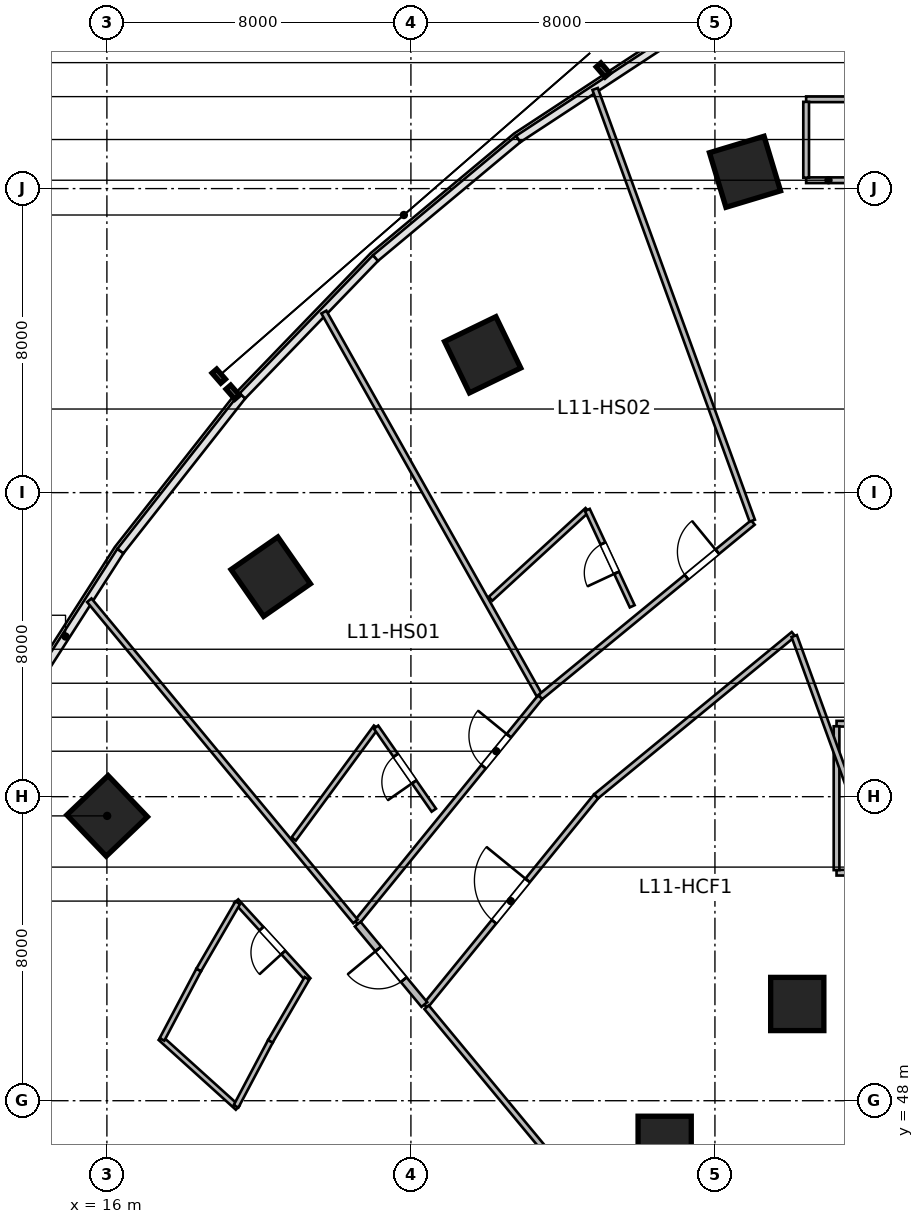
"""IFC4 building model, lengths in metres.
Left out: names, types, materials, properties, quantities, classifications, styles, units other than length and angle.
Written with IfcOpenShell. Run it as: python <this file> out.ifc"""

import sys

from ifc_helpers import new_model, si_unit, direction, frame, frame_2d, origin, origin_2d, place, context, subcontext, project, spatial, rectangle, circle, extrude, source, transform, mapped, element, fill, save


model = new_model("IFC4")
c1 = context("Model", 3, precision=1e-05, world=origin(), true_north=direction((0.0, 1.0)))
c2 = subcontext(c1, "Body", "Model", "MODEL_VIEW")
j1 = project(units=[si_unit("LENGTHUNIT", "METRE"), si_unit("PLANEANGLEUNIT", "RADIAN")], contexts=[c1])
p1 = place(None, origin())
s1 = spatial("IfcSite", under=j1, at=p1, CompositionType="ELEMENT")
p2 = place(p1, origin())
s2 = spatial("IfcBuilding", under=s1, at=p2, CompositionType="ELEMENT")
p3 = place(p2, frame((0.0, 0.0, 53.4)))
s3 = spatial("IfcBuildingStorey", under=s2, at=p3, CompositionType="ELEMENT", Elevation=53.4)
m1 = source(origin(), c2, "Body", "SweptSolid", [
    extrude(rectangle(XDim=1.5, YDim=1.5, at=origin_2d()), origin(), (0.0, 0.0, 1.0), 3.6),
])
p4 = place(p3, frame((16.007, 55.494, 0.0), z_axis=(0.0, 0.0, 1.0), x_axis=(-0.690756218984, 0.723087716626, 0.0)))
e1 = element("IfcColumn", 1, at=p4, inside=s3, PredefinedType="COLUMN", context=c2, shape_type="MappedRepresentation", body=[
    mapped(m1, transform((0.0, 0.0, 0.0), scale=1.0)),
])
m2 = source(origin(), c2, "Body", "SweptSolid", [
    extrude(circle(Radius=0.7, at=origin_2d()), origin(), (0.0, 0.0, 1.0), 3.6),
])
p5 = place(p3, frame((30.677, 46.892, 0.0), z_axis=(0.0, 0.0, 1.0), x_axis=(-0.571143442153, 0.820850271661, 0.0)))
e2 = element("IfcColumn", 2, at=p5, inside=s3, PredefinedType="COLUMN", context=c2, shape_type="MappedRepresentation", body=[
    mapped(m2, transform((0.0, 0.0, 0.0), scale=1.0)),
])
p6 = place(p3, frame((20.311, 61.789, 0.0), z_axis=(0.0, 0.0, 1.0), x_axis=(-0.571143442153, 0.820850271661, 0.0)))
e3 = element("IfcColumn", 3, at=p6, inside=s3, PredefinedType="COLUMN", context=c2, shape_type="MappedRepresentation", body=[
    mapped(m1, transform((0.0, 0.0, 0.0), scale=1.0)),
])
p7 = place(p3, frame((34.166, 50.545, 0.0), z_axis=(0.0, 0.0, 1.0), x_axis=(-0.436173672171, 0.899862504889, 0.0)))
e4 = element("IfcColumn", 4, at=p7, inside=s3, PredefinedType="COLUMN", context=c2, shape_type="MappedRepresentation", body=[
    mapped(m2, transform((0.0, 0.0, 0.0), scale=1.0)),
])
for number, where, z_axis, x_axis in (
    (5, (25.888, 67.627, 0.0), (0.0, 0.0, 1.0), (-0.436, 0.9, 0.0)),
    (6, (32.791, 72.442, 0.0), (0.0, 0.0, 1.0), (-0.289, 0.957, 0.0)),
):
    element("IfcColumn", number, at=place(p3, frame(where, z_axis=z_axis, x_axis=x_axis)), inside=s3, PredefinedType="COLUMN", context=c2, shape_type="MappedRepresentation", body=[
        mapped(m1, transform((0.0, 0.0, 0.0), scale=1.0)),
    ])
m3 = source(origin(), c2, "Body", "SweptSolid", [
    extrude(rectangle(XDim=2.1, YDim=0.15, at=frame_2d((1.05, 0.0))), origin(), (0.0, 0.0, 1.0), 3.36),
])
p8 = place(p3, frame((34.4, 72.22, 0.0), z_axis=(0.0, 0.0, 1.0), x_axis=(1.0, 0.0, 0.0)))
e7 = element("IfcWall", 7, at=p8, inside=s3, PredefinedType="PARTITIONING", context=c2, shape_type="MappedRepresentation", body=[
    mapped(m3, transform((0.0, 0.0, 0.0), scale=1.0)),
])
m4 = source(origin(), c2, "Body", "SweptSolid", [
    extrude(rectangle(XDim=3.1, YDim=0.15, at=frame_2d((1.55, 0.0))), origin(), (0.0, 0.0, 1.0), 2.729),
])
p9 = place(p3, frame((34.4, 74.35, 0.0), z_axis=(0.0, 0.0, 1.0), x_axis=(1.0, 0.0, 0.0)))
e8 = element("IfcWall", 8, at=p9, inside=s3, PredefinedType="PARTITIONING", context=c2, shape_type="MappedRepresentation", body=[
    mapped(m4, transform((0.0, 0.0, 0.0), scale=1.0)),
])
m5 = source(origin(), c2, "Body", "SweptSolid", [
    extrude(rectangle(XDim=1.995, YDim=0.15, at=frame_2d((0.998, 0.0))), origin(), (0.0, 0.0, 1.0), 3.36),
])
p10 = place(p3, frame((34.4, 72.288, 0.0), z_axis=(0.0, 0.0, 1.0), x_axis=(0.0, 1.0, 0.0)))
e9 = element("IfcWall", 9, at=p10, inside=s3, PredefinedType="PARTITIONING", context=c2, shape_type="MappedRepresentation", body=[
    mapped(m5, transform((0.0, 0.0, 0.0), scale=1.0)),
])
m6 = source(origin(), c2, "Body", "SweptSolid", [
    extrude(rectangle(XDim=6.6, YDim=0.15, at=frame_2d((3.3, 0.0))), origin(), (0.0, 0.0, 1.0), 2.803),
])
p11 = place(p3, frame((35.2, 54.0, 0.0), z_axis=(0.0, 0.0, 1.0), x_axis=(1.0, 0.0, 0.0)))
e10 = element("IfcWall", 10, at=p11, inside=s3, PredefinedType="PARTITIONING", context=c2, shape_type="MappedRepresentation", body=[
    mapped(m6, transform((0.0, 0.0, 0.0), scale=1.0)),
])
m7 = source(origin(), c2, "Body", "SweptSolid", [
    extrude(rectangle(XDim=6.6, YDim=0.15, at=frame_2d((3.3, 0.0))), origin(), (0.0, 0.0, 1.0), 3.36),
])
p12 = place(p3, frame((35.2, 57.92, 0.0), z_axis=(0.0, 0.0, 1.0), x_axis=(1.0, 0.0, 0.0)))
e11 = element("IfcWall", 11, at=p12, inside=s3, PredefinedType="PARTITIONING", context=c2, shape_type="MappedRepresentation", body=[
    mapped(m7, transform((0.0, 0.0, 0.0), scale=1.0)),
])
p13 = place(p12, frame((2.85, 0.0, 0.0)))
e12 = element("IfcOpeningElement", 12, at=p13, cuts=e11, PredefinedType="OPENING", context=c2, shape_type="SweptSolid", body=[
    extrude(rectangle(XDim=0.9, YDim=2.1, at=frame_2d((0.45, 1.05))), frame((0.0, 0.085, 0.0), z_axis=(0.0, -1.0, 0.0), x_axis=(1.0, 0.0, 0.0)), (0.0, 0.0, 1.0), 0.17),
])
m8 = source(origin(), c2, "Body", "SweptSolid", [
    extrude(rectangle(XDim=3.785, YDim=0.15, at=frame_2d((1.893, 0.0))), origin(), (0.0, 0.0, 1.0), 3.36),
])
p14 = place(p3, frame((35.2, 54.067, 0.0), z_axis=(0.0, 0.0, 1.0), x_axis=(0.0, 1.0, 0.0)))
e13 = element("IfcWall", 13, at=p14, inside=s3, PredefinedType="PARTITIONING", context=c2, shape_type="MappedRepresentation", body=[
    mapped(m8, transform((0.0, 0.0, 0.0), scale=1.0)),
])
m9 = source(origin(), c2, "Body", "SweptSolid", [
    extrude(rectangle(XDim=7.659, YDim=0.15, at=frame_2d((3.829, 0.0))), origin(), (0.0, 0.0, 1.0), 3.36),
])
p15 = place(p3, frame((22.57, 52.683, 0.0), z_axis=(0.0, 0.0, 1.0), x_axis=(0.631489868862, 0.775384127723, 0.0)))
e14 = element("IfcWall", 14, at=p15, inside=s3, PredefinedType="PARTITIONING", context=c2, shape_type="MappedRepresentation", body=[
    mapped(m9, transform((0.0, 0.0, 0.0), scale=1.0)),
])
p16 = place(p15, frame((5.295, 0.0, 0.0)))
e15 = element("IfcOpeningElement", 15, at=p16, cuts=e14, PredefinedType="OPENING", context=c2, shape_type="SweptSolid", body=[
    extrude(rectangle(XDim=1.05, YDim=2.15, at=frame_2d((0.525, 1.075))), frame((0.0, 0.085, 0.0), z_axis=(0.0, -1.0, 0.0), x_axis=(1.0, 0.0, 0.0)), (0.0, 0.0, 1.0), 0.17),
])
m10 = source(origin(), c2, "Body", "SweptSolid", [
    extrude(rectangle(XDim=10.975, YDim=0.15, at=frame_2d((5.487, 0.0))), origin(), (0.0, 0.0, 1.0), 3.36),
])
p17 = place(p3, frame((22.54, 52.719, 0.0), z_axis=(0.0, 0.0, 1.0), x_axis=(-0.638125265812, 0.769932558821, 0.0)))
e16 = element("IfcWall", 16, at=p17, inside=s3, PredefinedType="PARTITIONING", context=c2, shape_type="MappedRepresentation", body=[
    mapped(m10, transform((0.0, 0.0, 0.0), scale=1.0)),
])
m11 = source(origin(), c2, "Body", "SweptSolid", [
    extrude(rectangle(XDim=11.573, YDim=0.15, at=frame_2d((5.786, 0.0))), origin(), (0.0, 0.0, 1.0), 3.36),
])
p18 = place(p3, frame((27.382, 58.664, 0.0), z_axis=(0.0, 0.0, 1.0), x_axis=(-0.490161073951, 0.871631872744, 0.0)))
e17 = element("IfcWall", 17, at=p18, inside=s3, PredefinedType="PARTITIONING", context=c2, shape_type="MappedRepresentation", body=[
    mapped(m11, transform((0.0, 0.0, 0.0), scale=1.0)),
])
m12 = source(origin(), c2, "Body", "SweptSolid", [
    extrude(rectangle(XDim=3.656, YDim=0.14, at=frame_2d((1.828, 0.0))), origin(), (0.0, 0.0, 1.0), 3.36),
])
p19 = place(p3, frame((20.915, 54.886, 0.0), z_axis=(0.0, 0.0, 1.0), x_axis=(0.592700141555, 0.805423206892, 0.0)))
e18 = element("IfcWall", 18, at=p19, inside=s3, PredefinedType="PARTITIONING", context=c2, shape_type="MappedRepresentation", body=[
    mapped(m12, transform((0.0, 0.0, 0.0), scale=1.0)),
])
m13 = source(origin(), c2, "Body", "SweptSolid", [
    extrude(rectangle(XDim=2.663, YDim=0.14, at=frame_2d((1.332, 0.0))), origin(), (0.0, 0.0, 1.0), 2.644),
])
p20 = place(p3, frame((24.603, 55.645, 0.0), z_axis=(0.0, 0.0, 1.0), x_axis=(-0.570905989724, 0.821015438891, 0.0)))
e19 = element("IfcWall", 19, at=p20, inside=s3, PredefinedType="PARTITIONING", context=c2, shape_type="MappedRepresentation", body=[
    mapped(m13, transform((0.0, 0.0, 0.0), scale=1.0)),
])
p21 = place(p20, frame((0.906, 0.0, 0.0)))
e20 = element("IfcOpeningElement", 20, at=p21, cuts=e19, PredefinedType="OPENING", context=c2, shape_type="SweptSolid", body=[
    extrude(rectangle(XDim=0.85, YDim=2.05, at=frame_2d((0.425, 1.025))), frame((0.0, 0.08, 0.0), z_axis=(0.0, -1.0, 0.0), x_axis=(1.0, 0.0, 0.0)), (0.0, 0.0, 1.0), 0.16),
])
m14 = source(origin(), c2, "Body", "SweptSolid", [
    extrude(rectangle(XDim=7.237, YDim=0.15, at=frame_2d((3.618, 0.0))), origin(), (0.0, 0.0, 1.0), 3.36),
])
p22 = place(p3, frame((27.406, 58.621, 0.0), z_axis=(0.0, 0.0, 1.0), x_axis=(0.772813707793, 0.634632943557, 0.0)))
e21 = element("IfcWall", 21, at=p22, inside=s3, PredefinedType="PARTITIONING", context=c2, shape_type="MappedRepresentation", body=[
    mapped(m14, transform((0.0, 0.0, 0.0), scale=1.0)),
])
p23 = place(p22, frame((4.975, 0.0, 0.0)))
e22 = element("IfcOpeningElement", 22, at=p23, cuts=e21, PredefinedType="OPENING", context=c2, shape_type="SweptSolid", body=[
    extrude(rectangle(XDim=1.05, YDim=2.15, at=frame_2d((0.525, 1.075))), frame((0.0, 0.085, 0.0), z_axis=(0.0, -1.0, 0.0), x_axis=(1.0, 0.0, 0.0)), (0.0, 0.0, 1.0), 0.17),
])
m15 = source(origin(), c2, "Body", "SweptSolid", [
    extrude(rectangle(XDim=12.088, YDim=0.15, at=frame_2d((6.044, 0.0))), origin(), (0.0, 0.0, 1.0), 3.36),
])
p24 = place(p3, frame((32.981, 63.262, 0.0), z_axis=(0.0, 0.0, 1.0), x_axis=(-0.34203007529, 0.939689005787, 0.0)))
e23 = element("IfcWall", 23, at=p24, inside=s3, PredefinedType="PARTITIONING", context=c2, shape_type="MappedRepresentation", body=[
    mapped(m15, transform((0.0, 0.0, 0.0), scale=1.0)),
])
m16 = source(origin(), c2, "Body", "SweptSolid", [
    extrude(rectangle(XDim=3.456, YDim=0.14, at=frame_2d((1.728, 0.0))), origin(), (0.0, 0.0, 1.0), 3.36),
])
p25 = place(p3, frame((26.095, 61.207, 0.0), z_axis=(0.0, 0.0, 1.0), x_axis=(0.736860870293, 0.676044420013, 0.0)))
e24 = element("IfcWall", 24, at=p25, inside=s3, PredefinedType="PARTITIONING", context=c2, shape_type="MappedRepresentation", body=[
    mapped(m16, transform((0.0, 0.0, 0.0), scale=1.0)),
])
m17 = source(origin(), c2, "Body", "SweptSolid", [
    extrude(rectangle(XDim=2.796, YDim=0.14, at=frame_2d((1.398, 0.0))), origin(), (0.0, 0.0, 1.0), 3.36),
])
p26 = place(p3, frame((29.823, 61.009, 0.0), z_axis=(0.0, 0.0, 1.0), x_axis=(-0.422316594955, 0.906448395456, 0.0)))
e25 = element("IfcWall", 25, at=p26, inside=s3, PredefinedType="PARTITIONING", context=c2, shape_type="MappedRepresentation", body=[
    mapped(m17, transform((0.0, 0.0, 0.0), scale=1.0)),
])
p27 = place(p26, frame((0.973, 0.0, 0.0)))
e26 = element("IfcOpeningElement", 26, at=p27, cuts=e25, PredefinedType="OPENING", context=c2, shape_type="SweptSolid", body=[
    extrude(rectangle(XDim=0.85, YDim=2.05, at=frame_2d((0.425, 1.025))), frame((0.0, 0.08, 0.0), z_axis=(0.0, -1.0, 0.0), x_axis=(1.0, 0.0, 0.0)), (0.0, 0.0, 1.0), 0.16),
])
m18 = source(origin(), c2, "Body", "SweptSolid", [
    extrude(rectangle(XDim=7.113, YDim=0.15, at=frame_2d((3.556, 0.0))), origin(), (0.0, 0.0, 1.0), 3.36),
])
p28 = place(p3, frame((24.383, 50.495, 0.0), z_axis=(0.0, 0.0, 1.0), x_axis=(0.63149032532, 0.775383755974, 0.0)))
e27 = element("IfcWall", 27, at=p28, inside=s3, PredefinedType="PARTITIONING", context=c2, shape_type="MappedRepresentation", body=[
    mapped(m18, transform((0.0, 0.0, 0.0), scale=1.0)),
])
p29 = place(p28, frame((2.856, 0.0, 0.0)))
e28 = element("IfcOpeningElement", 28, at=p29, cuts=e27, PredefinedType="OPENING", context=c2, shape_type="SweptSolid", body=[
    extrude(rectangle(XDim=1.4, YDim=2.15, at=frame_2d((0.7, 1.075))), frame((0.0, 0.085, 0.0), z_axis=(0.0, -1.0, 0.0), x_axis=(1.0, 0.0, 0.0)), (0.0, 0.0, 1.0), 0.17),
])
m19 = source(origin(), c2, "Body", "SweptSolid", [
    extrude(rectangle(XDim=6.721, YDim=0.15, at=frame_2d((3.361, 0.0))), origin(), (0.0, 0.0, 1.0), 3.36),
])
p30 = place(p3, frame((28.874, 56.01, 0.0), z_axis=(0.0, 0.0, 1.0), x_axis=(0.772828051199, 0.63461547671, 0.0)))
e29 = element("IfcWall", 29, at=p30, inside=s3, PredefinedType="PARTITIONING", context=c2, shape_type="MappedRepresentation", body=[
    mapped(m19, transform((0.0, 0.0, 0.0), scale=1.0)),
])
m20 = source(origin(), c2, "Body", "SweptSolid", [
    extrude(rectangle(XDim=11.053, YDim=0.15, at=frame_2d((5.527, 0.0))), origin(), (0.0, 0.0, 1.0), 3.36),
])
p31 = place(p3, frame((31.466, 41.949, 0.0), z_axis=(0.0, 0.0, 1.0), x_axis=(-0.638131235571, 0.769927611005, 0.0)))
e30 = element("IfcWall", 30, at=p31, inside=s3, PredefinedType="PARTITIONING", context=c2, shape_type="MappedRepresentation", body=[
    mapped(m20, transform((0.0, 0.0, 0.0), scale=1.0)),
])
m21 = source(origin(), c2, "Body", "SweptSolid", [
    extrude(rectangle(XDim=12.196, YDim=0.15, at=frame_2d((6.098, 0.0))), origin(), (0.0, 0.0, 1.0), 3.36),
])
p32 = place(p3, frame((38.258, 48.766, 0.0), z_axis=(0.0, 0.0, 1.0), x_axis=(-0.342022711534, 0.939691686031, 0.0)))
e31 = element("IfcWall", 31, at=p32, inside=s3, PredefinedType="PARTITIONING", context=c2, shape_type="MappedRepresentation", body=[
    mapped(m21, transform((0.0, 0.0, 0.0), scale=1.0)),
])
m22 = source(origin(), c2, "Body", "SweptSolid", [
    extrude(rectangle(XDim=2.748, YDim=0.195, at=frame_2d((1.374, 0.0))), origin(), (0.0, 0.0, 1.0), 3.36),
])
p33 = place(p3, frame((24.353, 50.531, 0.0), z_axis=(0.0, 0.0, 1.0), x_axis=(-0.638111168284, 0.769944242729, 0.0)))
e32 = element("IfcWall", 32, at=p33, inside=s3, PredefinedType="PARTITIONING", context=c2, shape_type="MappedRepresentation", body=[
    mapped(m22, transform((0.0, 0.0, 0.0), scale=1.0)),
])
p34 = place(p33, frame((0.849, 0.0, 0.0)))
e33 = element("IfcOpeningElement", 33, at=p34, cuts=e32, PredefinedType="OPENING", context=c2, shape_type="SweptSolid", body=[
    extrude(rectangle(XDim=1.05, YDim=2.15, at=frame_2d((0.525, 1.075))), frame((0.0, 0.107, 0.0), z_axis=(0.0, -1.0, 0.0), x_axis=(1.0, 0.0, 0.0)), (0.0, 0.0, 1.0), 0.215),
])
m23 = source(origin(), c2, "Body", "SweptSolid", [
    extrude(rectangle(XDim=2.812, YDim=0.14, at=frame_2d((1.406, 0.0))), origin(), (0.0, 0.0, 1.0), 3.36),
])
p35 = place(p3, frame((21.303, 51.177, 0.0), z_axis=(0.0, 0.0, 1.0), x_axis=(-0.675119025852, 0.737708818527, 0.0)))
e34 = element("IfcWall", 34, at=p35, inside=s3, PredefinedType="PARTITIONING", context=c2, shape_type="MappedRepresentation", body=[
    mapped(m23, transform((0.0, 0.0, 0.0), scale=1.0)),
])
p36 = place(p35, frame((0.981, 0.0, 0.0)))
e35 = element("IfcOpeningElement", 35, at=p36, cuts=e34, PredefinedType="OPENING", context=c2, shape_type="SweptSolid", body=[
    extrude(rectangle(XDim=0.85, YDim=2.05, at=frame_2d((0.425, 1.025))), frame((0.0, 0.08, 0.0), z_axis=(0.0, -1.0, 0.0), x_axis=(1.0, 0.0, 0.0)), (0.0, 0.0, 1.0), 0.16),
])
m24 = source(origin(), c2, "Body", "SweptSolid", [
    extrude(rectangle(XDim=2.738, YDim=0.14, at=frame_2d((1.369, 0.0))), origin(), (0.0, 0.0, 1.0), 3.36),
])
p37 = place(p3, frame((19.44, 47.814, 0.0), z_axis=(0.0, 0.0, 1.0), x_axis=(-0.741873676582, 0.670539669218, 0.0)))
e36 = element("IfcWall", 36, at=p37, inside=s3, PredefinedType="PARTITIONING", context=c2, shape_type="MappedRepresentation", body=[
    mapped(m24, transform((0.0, 0.0, 0.0), scale=1.0)),
])
m25 = source(origin(), c2, "Body", "SweptSolid", [
    extrude(rectangle(XDim=1.936, YDim=0.14, at=frame_2d((0.968, 0.0))), origin(), (0.0, 0.0, 1.0), 3.36),
])
p38 = place(p3, frame((19.398, 47.852, 0.0), z_axis=(0.0, 0.0, 1.0), x_axis=(0.467174971862, 0.884164886017, 0.0)))
e37 = element("IfcWall", 37, at=p38, inside=s3, PredefinedType="PARTITIONING", context=c2, shape_type="MappedRepresentation", body=[
    mapped(m25, transform((0.0, 0.0, 0.0), scale=1.0)),
])
m26 = source(origin(), c2, "Body", "SweptSolid", [
    extrude(rectangle(XDim=2.068, YDim=0.14, at=frame_2d((1.034, 0.0))), origin(), (0.0, 0.0, 1.0), 3.36),
])
p39 = place(p3, frame((17.45, 49.612, 0.0), z_axis=(0.0, 0.0, 1.0), x_axis=(0.467215057643, 0.884143704333, 0.0)))
e38 = element("IfcWall", 38, at=p39, inside=s3, PredefinedType="PARTITIONING", context=c2, shape_type="MappedRepresentation", body=[
    mapped(m26, transform((0.0, 0.0, 0.0), scale=1.0)),
])
m27 = source(origin(), c2, "Body", "SweptSolid", [
    extrude(rectangle(XDim=1.914, YDim=0.14, at=frame_2d((0.957, 0.0))), origin(), (0.0, 0.0, 1.0), 3.36),
])
p40 = place(p3, frame((20.303, 49.563, 0.0), z_axis=(0.0, 0.0, 1.0), x_axis=(0.502347790612, 0.864665656347, 0.0)))
e39 = element("IfcWall", 39, at=p40, inside=s3, PredefinedType="PARTITIONING", context=c2, shape_type="MappedRepresentation", body=[
    mapped(m27, transform((0.0, 0.0, 0.0), scale=1.0)),
])
m28 = source(origin(), c2, "Body", "SweptSolid", [
    extrude(rectangle(XDim=2.045, YDim=0.14, at=frame_2d((1.022, 0.0))), origin(), (0.0, 0.0, 1.0), 3.36),
])
p41 = place(p3, frame((18.416, 51.441, 0.0), z_axis=(0.0, 0.0, 1.0), x_axis=(0.5023112139, 0.864686905411, 0.0)))
e40 = element("IfcWall", 40, at=p41, inside=s3, PredefinedType="PARTITIONING", context=c2, shape_type="MappedRepresentation", body=[
    mapped(m28, transform((0.0, 0.0, 0.0), scale=1.0)),
])
m29 = source(origin(), c2, "Body", "SweptSolid", [
    extrude(rectangle(XDim=1.05, YDim=2.15, at=frame_2d((0.525, 1.075))), frame((0.0, 0.025, 0.0), z_axis=(0.0, -1.0, 0.0), x_axis=(1.0, 0.0, 0.0)), (0.0, 0.0, 1.0), 0.05),
])
p42 = place(p16, origin())
e41 = element("IfcDoor", 41, at=p42, inside=s3, OperationType="SINGLE_SWING_RIGHT", PredefinedType="DOOR", context=c2, shape_type="MappedRepresentation", body=[
    mapped(m29, transform((0.0, 0.0, 0.0), scale=1.0)),
])
fill(e15, e41)
m30 = source(origin(), c2, "Body", "SweptSolid", [
    extrude(rectangle(XDim=0.85, YDim=2.05, at=frame_2d((0.425, 1.025))), frame((0.0, 0.025, 0.0), z_axis=(0.0, -1.0, 0.0), x_axis=(1.0, 0.0, 0.0)), (0.0, 0.0, 1.0), 0.05),
])
p43 = place(p21, origin())
e42 = element("IfcDoor", 42, at=p43, inside=s3, OperationType="SINGLE_SWING_LEFT", PredefinedType="DOOR", context=c2, shape_type="MappedRepresentation", body=[
    mapped(m30, transform((0.0, 0.0, 0.0), scale=1.0)),
])
fill(e20, e42)
p44 = place(p23, origin())
e43 = element("IfcDoor", 43, at=p44, inside=s3, OperationType="SINGLE_SWING_RIGHT", PredefinedType="DOOR", context=c2, shape_type="MappedRepresentation", body=[
    mapped(m29, transform((0.0, 0.0, 0.0), scale=1.0)),
])
fill(e22, e43)
p45 = place(p27, origin())
e44 = element("IfcDoor", 44, at=p45, inside=s3, OperationType="SINGLE_SWING_LEFT", PredefinedType="DOOR", context=c2, shape_type="MappedRepresentation", body=[
    mapped(m30, transform((0.0, 0.0, 0.0), scale=1.0)),
])
fill(e26, e44)
m31 = source(origin(), c2, "Body", "SweptSolid", [
    extrude(rectangle(XDim=1.4, YDim=2.15, at=frame_2d((0.7, 1.075))), frame((0.0, 0.025, 0.0), z_axis=(0.0, -1.0, 0.0), x_axis=(1.0, 0.0, 0.0)), (0.0, 0.0, 1.0), 0.05),
])
p46 = place(p29, origin())
e45 = element("IfcDoor", 45, at=p46, inside=s3, OperationType="SINGLE_SWING_RIGHT", PredefinedType="DOOR", context=c2, shape_type="MappedRepresentation", body=[
    mapped(m31, transform((0.0, 0.0, 0.0), scale=1.0)),
])
fill(e28, e45)
p47 = place(p34, origin())
e46 = element("IfcDoor", 46, at=p47, inside=s3, OperationType="SINGLE_SWING_RIGHT", PredefinedType="DOOR", context=c2, shape_type="MappedRepresentation", body=[
    mapped(m29, transform((0.0, 0.0, 0.0), scale=1.0)),
])
fill(e33, e46)
p48 = place(p36, origin())
e47 = element("IfcDoor", 47, at=p48, inside=s3, OperationType="SINGLE_SWING_LEFT", PredefinedType="DOOR", context=c2, shape_type="MappedRepresentation", body=[
    mapped(m30, transform((0.0, 0.0, 0.0), scale=1.0)),
])
fill(e35, e47)
save(model, sys.argv[1])
